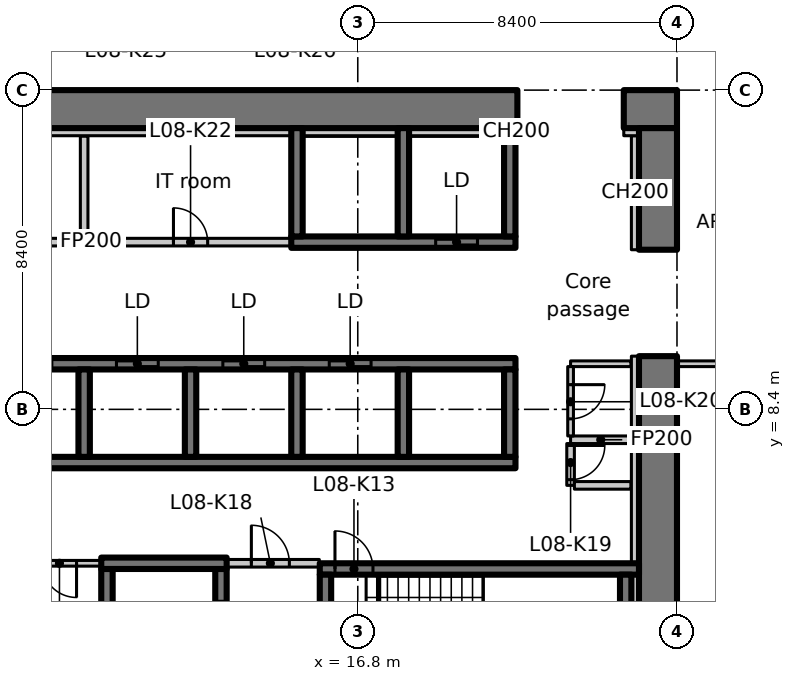
"""IFC4 building model, lengths in metres.
Left out: names, types, materials, properties, quantities, classifications, styles, units other than length and angle.
Written with IfcOpenShell. Run it as: python <this file> out.ifc"""

import sys

from ifc_helpers import new_model, si_unit, direction, frame, frame_2d, origin, place, context, subcontext, project, spatial, rectangle, extrude, element, fill, save


model = new_model("IFC4")
c1 = context("Model", 3, precision=1e-05, world=origin(), true_north=direction((0.0, 1.0)))
c2 = subcontext(c1, "Body", "Model", "MODEL_VIEW")
j1 = project(units=[si_unit("LENGTHUNIT", "METRE"), si_unit("PLANEANGLEUNIT", "RADIAN")], contexts=[c1])
p1 = place(None, origin())
s1 = spatial("IfcSite", under=j1, at=p1, CompositionType="ELEMENT")
p2 = place(p1, origin())
s2 = spatial("IfcBuilding", under=s1, at=p2, CompositionType="ELEMENT")
p3 = place(p2, frame((0.0, 0.0, 43.7)))
s3 = spatial("IfcBuildingStorey", under=s2, at=p3, CompositionType="ELEMENT", Elevation=43.7)
p4 = place(p3, frame((-1.1, 16.3, 0.0), z_axis=(0.0, 0.0, 1.0), x_axis=(1.0, 0.0, 0.0)))
e1 = element("IfcWall", 1, at=p4, inside=s3, PredefinedType="SHEAR", context=c2, shape_type="SweptSolid", body=[
    extrude(rectangle(XDim=22.1, YDim=1.0, at=frame_2d((11.05, 0.0))), origin(), (0.0, 0.0, 1.0), 3.35),
])
p5 = place(p4, frame((3.15, 0.0, 0.0)))
e2 = element("IfcOpeningElement", 2, at=p5, cuts=e1, PredefinedType="OPENING", context=c2, shape_type="SweptSolid", body=[
    extrude(rectangle(XDim=1.1, YDim=2.3, at=frame_2d((0.55, 1.15))), frame((0.0, 0.51, 0.0), z_axis=(0.0, -1.0, 0.0), x_axis=(1.0, 0.0, 0.0)), (0.0, 0.0, 1.0), 1.02),
])
p6 = place(p3, frame((23.8, 16.3, 0.0), z_axis=(0.0, 0.0, 1.0), x_axis=(1.0, 0.0, 0.0)))
e3 = element("IfcWall", 3, at=p6, inside=s3, PredefinedType="SHEAR", context=c2, shape_type="SweptSolid", body=[
    extrude(rectangle(XDim=1.4, YDim=1.0, at=frame_2d((0.7, 0.0))), origin(), (0.0, 0.0, 1.0), 3.35),
])
p7 = place(p3, frame((24.7, 1.0, 0.0), z_axis=(0.0, 0.0, 1.0), x_axis=(0.0, 1.0, 0.0)))
e4 = element("IfcWall", 4, at=p7, inside=s3, PredefinedType="SHEAR", context=c2, shape_type="SweptSolid", body=[
    extrude(rectangle(XDim=8.8, YDim=1.0, at=frame_2d((4.4, 0.0))), origin(), (0.0, 0.0, 1.0), 3.35),
])
p8 = place(p3, frame((24.7, 12.6, 0.0), z_axis=(0.0, 0.0, 1.0), x_axis=(0.0, 1.0, 0.0)))
e5 = element("IfcWall", 5, at=p8, inside=s3, PredefinedType="SHEAR", context=c2, shape_type="SweptSolid", body=[
    extrude(rectangle(XDim=3.2, YDim=1.0, at=frame_2d((1.6, 0.0))), origin(), (0.0, 0.0, 1.0), 3.35),
])
p9 = place(p3, frame((24.1, 12.6, 0.0), z_axis=(0.0, 0.0, 1.0), x_axis=(0.0, 1.0, 0.0)))
e6 = element("IfcWall", 6, at=p9, inside=s3, PredefinedType="PARTITIONING", context=c2, shape_type="SweptSolid", body=[
    extrude(rectangle(XDim=3.0, YDim=0.2, at=frame_2d((1.5, 0.0))), origin(), (0.0, 0.0, 1.0), 3.35),
])
p10 = place(p3, frame((23.8, 15.7, 0.0), z_axis=(0.0, 0.0, 1.0), x_axis=(1.0, 0.0, 0.0)))
e7 = element("IfcWall", 7, at=p10, inside=s3, PredefinedType="PARTITIONING", context=c2, shape_type="SweptSolid", body=[
    extrude(rectangle(XDim=0.4, YDim=0.2, at=frame_2d((0.2, 0.0))), origin(), (0.0, 0.0, 1.0), 3.35),
])
p11 = place(p3, frame((1.0, 7.0, 0.0), z_axis=(0.0, 0.0, 1.0), x_axis=(1.0, 0.0, 0.0)))
e8 = element("IfcWall", 8, at=p11, inside=s3, PredefinedType="SHEAR", context=c2, shape_type="SweptSolid", body=[
    extrude(rectangle(XDim=19.95, YDim=0.3, at=frame_2d((9.975, 0.0))), origin(), (0.0, 0.0, 1.0), 3.35),
])
p12 = place(p3, frame((1.0, 9.6, 0.0), z_axis=(0.0, 0.0, 1.0), x_axis=(1.0, 0.0, 0.0)))
e9 = element("IfcWall", 9, at=p12, inside=s3, PredefinedType="SHEAR", context=c2, shape_type="SweptSolid", body=[
    extrude(rectangle(XDim=19.95, YDim=0.3, at=frame_2d((9.975, 0.0))), origin(), (0.0, 0.0, 1.0), 3.35),
])
p13 = place(p12, frame((1.05, 0.0, 0.0)))
e10 = element("IfcOpeningElement", 10, at=p13, cuts=e9, PredefinedType="OPENING", context=c2, shape_type="SweptSolid", body=[
    extrude(rectangle(XDim=1.1, YDim=2.3, at=frame_2d((0.55, 1.15))), frame((0.0, 0.16, 0.0), z_axis=(0.0, -1.0, 0.0), x_axis=(1.0, 0.0, 0.0)), (0.0, 0.0, 1.0), 0.32),
])
p14 = place(p12, frame((3.85, 0.0, 0.0)))
e11 = element("IfcOpeningElement", 11, at=p14, cuts=e9, PredefinedType="OPENING", context=c2, shape_type="SweptSolid", body=[
    extrude(rectangle(XDim=1.1, YDim=2.3, at=frame_2d((0.55, 1.15))), frame((0.0, 0.16, 0.0), z_axis=(0.0, -1.0, 0.0), x_axis=(1.0, 0.0, 0.0)), (0.0, 0.0, 1.0), 0.32),
])
p15 = place(p12, frame((6.65, 0.0, 0.0)))
e12 = element("IfcOpeningElement", 12, at=p15, cuts=e9, PredefinedType="OPENING", context=c2, shape_type="SweptSolid", body=[
    extrude(rectangle(XDim=1.1, YDim=2.3, at=frame_2d((0.55, 1.15))), frame((0.0, 0.16, 0.0), z_axis=(0.0, -1.0, 0.0), x_axis=(1.0, 0.0, 0.0)), (0.0, 0.0, 1.0), 0.32),
])
p16 = place(p12, frame((9.45, 0.0, 0.0)))
e13 = element("IfcOpeningElement", 13, at=p16, cuts=e9, PredefinedType="OPENING", context=c2, shape_type="SweptSolid", body=[
    extrude(rectangle(XDim=1.1, YDim=2.3, at=frame_2d((0.55, 1.15))), frame((0.0, 0.16, 0.0), z_axis=(0.0, -1.0, 0.0), x_axis=(1.0, 0.0, 0.0)), (0.0, 0.0, 1.0), 0.32),
])
p17 = place(p12, frame((12.25, 0.0, 0.0)))
e14 = element("IfcOpeningElement", 14, at=p17, cuts=e9, PredefinedType="OPENING", context=c2, shape_type="SweptSolid", body=[
    extrude(rectangle(XDim=1.1, YDim=2.3, at=frame_2d((0.55, 1.15))), frame((0.0, 0.16, 0.0), z_axis=(0.0, -1.0, 0.0), x_axis=(1.0, 0.0, 0.0)), (0.0, 0.0, 1.0), 0.32),
])
p18 = place(p12, frame((15.05, 0.0, 0.0)))
e15 = element("IfcOpeningElement", 15, at=p18, cuts=e9, PredefinedType="OPENING", context=c2, shape_type="SweptSolid", body=[
    extrude(rectangle(XDim=1.1, YDim=2.3, at=frame_2d((0.55, 1.15))), frame((0.0, 0.16, 0.0), z_axis=(0.0, -1.0, 0.0), x_axis=(1.0, 0.0, 0.0)), (0.0, 0.0, 1.0), 0.32),
])
for number, where, z_axis, x_axis in (
    (16, (9.6, 7.15, 0.0), (0.0, 0.0, 1.0), (0.0, 1.0, 0.0)),
    (17, (12.4, 7.15, 0.0), (0.0, 0.0, 1.0), (0.0, 1.0, 0.0)),
    (18, (15.2, 7.15, 0.0), (0.0, 0.0, 1.0), (0.0, 1.0, 0.0)),
    (19, (18.0, 7.15, 0.0), (0.0, 0.0, 1.0), (0.0, 1.0, 0.0)),
    (20, (20.8, 7.15, 0.0), (0.0, 0.0, 1.0), (0.0, 1.0, 0.0)),
):
    element("IfcWall", number, at=place(p3, frame(where, z_axis=z_axis, x_axis=x_axis)), inside=s3, PredefinedType="SHEAR", context=c2, shape_type="SweptSolid", body=[
        extrude(rectangle(XDim=2.3, YDim=0.3, at=frame_2d((1.15, 0.0))), origin(), (0.0, 0.0, 1.0), 3.35),
    ])
p19 = place(p3, frame((15.05, 12.8, 0.0), z_axis=(0.0, 0.0, 1.0), x_axis=(1.0, 0.0, 0.0)))
e21 = element("IfcWall", 21, at=p19, inside=s3, PredefinedType="SHEAR", context=c2, shape_type="SweptSolid", body=[
    extrude(rectangle(XDim=5.9, YDim=0.3, at=frame_2d((2.95, 0.0))), origin(), (0.0, 0.0, 1.0), 3.35),
])
p20 = place(p19, frame((3.8, 0.0, 0.0)))
e22 = element("IfcOpeningElement", 22, at=p20, cuts=e21, PredefinedType="OPENING", context=c2, shape_type="SweptSolid", body=[
    extrude(rectangle(XDim=1.1, YDim=2.3, at=frame_2d((0.55, 1.15))), frame((0.0, 0.16, 0.0), z_axis=(0.0, -1.0, 0.0), x_axis=(1.0, 0.0, 0.0)), (0.0, 0.0, 1.0), 0.32),
])
for number, where, z_axis, x_axis in (
    (23, (15.2, 12.95, 0.0), (0.0, 0.0, 1.0), (0.0, 1.0, 0.0)),
    (24, (18.0, 12.95, 0.0), (0.0, 0.0, 1.0), (0.0, 1.0, 0.0)),
    (25, (20.8, 12.95, 0.0), (0.0, 0.0, 1.0), (0.0, 1.0, 0.0)),
):
    element("IfcWall", number, at=place(p3, frame(where, z_axis=z_axis, x_axis=x_axis)), inside=s3, PredefinedType="SHEAR", context=c2, shape_type="SweptSolid", body=[
        extrude(rectangle(XDim=2.85, YDim=0.3, at=frame_2d((1.425, 0.0))), origin(), (0.0, 0.0, 1.0), 3.35),
    ])
p21 = place(p3, frame((10.2, 1.0, 0.0), z_axis=(0.0, 0.0, 1.0), x_axis=(0.0, 1.0, 0.0)))
e26 = element("IfcWall", 26, at=p21, inside=s3, PredefinedType="SHEAR", context=c2, shape_type="SweptSolid", body=[
    extrude(rectangle(XDim=3.2, YDim=0.3, at=frame_2d((1.6, 0.0))), origin(), (0.0, 0.0, 1.0), 3.35),
])
p22 = place(p3, frame((13.2, 1.0, 0.0), z_axis=(0.0, 0.0, 1.0), x_axis=(0.0, 1.0, 0.0)))
e27 = element("IfcWall", 27, at=p22, inside=s3, PredefinedType="SHEAR", context=c2, shape_type="SweptSolid", body=[
    extrude(rectangle(XDim=3.2, YDim=0.3, at=frame_2d((1.6, 0.0))), origin(), (0.0, 0.0, 1.0), 3.35),
])
p23 = place(p22, frame((1.25, 0.0, 0.0)))
e28 = element("IfcOpeningElement", 28, at=p23, cuts=e27, PredefinedType="OPENING", context=c2, shape_type="SweptSolid", body=[
    extrude(rectangle(XDim=1.1, YDim=2.3, at=frame_2d((0.55, 1.15))), frame((0.0, 0.16, 0.0), z_axis=(0.0, -1.0, 0.0), x_axis=(1.0, 0.0, 0.0)), (0.0, 0.0, 1.0), 0.32),
])
p24 = place(p3, frame((10.05, 4.35, 0.0), z_axis=(0.0, 0.0, 1.0), x_axis=(1.0, 0.0, 0.0)))
e29 = element("IfcWall", 29, at=p24, inside=s3, PredefinedType="SHEAR", context=c2, shape_type="SweptSolid", body=[
    extrude(rectangle(XDim=3.3, YDim=0.3, at=frame_2d((1.65, 0.0))), origin(), (0.0, 0.0, 1.0), 3.35),
])
p25 = place(p3, frame((15.8, 4.2, 0.0), z_axis=(0.0, 0.0, 1.0), x_axis=(1.0, 0.0, 0.0)))
e30 = element("IfcWall", 30, at=p25, inside=s3, PredefinedType="SHEAR", context=c2, shape_type="SweptSolid", body=[
    extrude(rectangle(XDim=8.4, YDim=0.3, at=frame_2d((4.2, 0.0))), origin(), (0.0, 0.0, 1.0), 3.35),
])
p26 = place(p25, frame((0.4, 0.0, 0.0)))
e31 = element("IfcOpeningElement", 31, at=p26, cuts=e30, PredefinedType="OPENING", context=c2, shape_type="SweptSolid", body=[
    extrude(rectangle(XDim=1.0, YDim=2.1, at=frame_2d((0.5, 1.05))), frame((0.0, 0.16, 0.0), z_axis=(0.0, -1.0, 0.0), x_axis=(1.0, 0.0, 0.0)), (0.0, 0.0, 1.0), 0.32),
])
p27 = place(p3, frame((15.95, 1.5, 0.0), z_axis=(0.0, 0.0, 1.0), x_axis=(0.0, 1.0, 0.0)))
e32 = element("IfcWall", 32, at=p27, inside=s3, PredefinedType="SHEAR", context=c2, shape_type="SweptSolid", body=[
    extrude(rectangle(XDim=2.55, YDim=0.3, at=frame_2d((1.275, 0.0))), origin(), (0.0, 0.0, 1.0), 3.35),
])
p28 = place(p27, frame((0.8, 0.0, 0.0)))
e33 = element("IfcOpeningElement", 33, at=p28, cuts=e32, PredefinedType="OPENING", context=c2, shape_type="SweptSolid", body=[
    extrude(rectangle(XDim=1.0, YDim=2.1, at=frame_2d((0.5, 1.05))), frame((0.0, 0.16, 0.0), z_axis=(0.0, -1.0, 0.0), x_axis=(1.0, 0.0, 0.0)), (0.0, 0.0, 1.0), 0.32),
])
p29 = place(p3, frame((23.85, 1.5, 0.0), z_axis=(0.0, 0.0, 1.0), x_axis=(0.0, 1.0, 0.0)))
e34 = element("IfcWall", 34, at=p29, inside=s3, PredefinedType="SHEAR", context=c2, shape_type="SweptSolid", body=[
    extrude(rectangle(XDim=2.55, YDim=0.3, at=frame_2d((1.275, 0.0))), origin(), (0.0, 0.0, 1.0), 3.35),
])
p30 = place(p3, frame((13.362, 4.35, 0.0), z_axis=(0.0, 0.0, 1.0), x_axis=(1.0, 0.0, 0.0)))
e35 = element("IfcWall", 35, at=p30, inside=s3, PredefinedType="PARTITIONING", context=c2, shape_type="SweptSolid", body=[
    extrude(rectangle(XDim=2.426, YDim=0.2, at=frame_2d((1.213, 0.0))), origin(), (0.0, 0.0, 1.0), 3.35),
])
p31 = place(p30, frame((0.638, 0.0, 0.0)))
e36 = element("IfcOpeningElement", 36, at=p31, cuts=e35, PredefinedType="OPENING", context=c2, shape_type="SweptSolid", body=[
    extrude(rectangle(XDim=1.0, YDim=2.1, at=frame_2d((0.5, 1.05))), frame((0.0, 0.11, 0.0), z_axis=(0.0, -1.0, 0.0), x_axis=(1.0, 0.0, 0.0)), (0.0, 0.0, 1.0), 0.22),
])
p32 = place(p3, frame((4.162, 12.8, 0.0), z_axis=(0.0, 0.0, 1.0), x_axis=(1.0, 0.0, 0.0)))
e37 = element("IfcWall", 37, at=p32, inside=s3, PredefinedType="PARTITIONING", context=c2, shape_type="SweptSolid", body=[
    extrude(rectangle(XDim=5.438, YDim=0.2, at=frame_2d((2.719, 0.0))), origin(), (0.0, 0.0, 1.0), 3.35),
])
p33 = place(p32, frame((2.188, 0.0, 0.0)))
e38 = element("IfcOpeningElement", 38, at=p33, cuts=e37, PredefinedType="OPENING", context=c2, shape_type="SweptSolid", body=[
    extrude(rectangle(XDim=0.9, YDim=2.1, at=frame_2d((0.45, 1.05))), frame((0.0, 0.11, 0.0), z_axis=(0.0, -1.0, 0.0), x_axis=(1.0, 0.0, 0.0)), (0.0, 0.0, 1.0), 0.22),
])
p34 = place(p3, frame((9.6, 12.8, 0.0), z_axis=(0.0, 0.0, 1.0), x_axis=(1.0, 0.0, 0.0)))
e39 = element("IfcWall", 39, at=p34, inside=s3, PredefinedType="PARTITIONING", context=c2, shape_type="SweptSolid", body=[
    extrude(rectangle(XDim=5.438, YDim=0.2, at=frame_2d((2.719, 0.0))), origin(), (0.0, 0.0, 1.0), 3.35),
])
p35 = place(p34, frame((2.35, 0.0, 0.0)))
e40 = element("IfcOpeningElement", 40, at=p35, cuts=e39, PredefinedType="OPENING", context=c2, shape_type="SweptSolid", body=[
    extrude(rectangle(XDim=0.9, YDim=2.1, at=frame_2d((0.45, 1.05))), frame((0.0, 0.11, 0.0), z_axis=(0.0, -1.0, 0.0), x_axis=(1.0, 0.0, 0.0)), (0.0, 0.0, 1.0), 0.22),
])
p36 = place(p3, frame((9.6, 15.588, 0.0), z_axis=(0.0, 0.0, 1.0), x_axis=(0.0, -1.0, 0.0)))
e41 = element("IfcWall", 41, at=p36, inside=s3, PredefinedType="PARTITIONING", context=c2, shape_type="SweptSolid", body=[
    extrude(rectangle(XDim=2.688, YDim=0.2, at=frame_2d((1.344, 0.0))), origin(), (0.0, 0.0, 1.0), 3.35),
])
p37 = place(p3, frame((23.988, 7.6, 0.0), z_axis=(0.0, 0.0, 1.0), x_axis=(-1.0, 0.0, 0.0)))
e42 = element("IfcWall", 42, at=p37, inside=s3, PredefinedType="PARTITIONING", context=c2, shape_type="SweptSolid", body=[
    extrude(rectangle(XDim=1.588, YDim=0.2, at=frame_2d((0.794, 0.0))), origin(), (0.0, 0.0, 1.0), 3.35),
])
p38 = place(p3, frame((22.4, 7.5, 0.0), z_axis=(0.0, 0.0, 1.0), x_axis=(0.0, -1.0, 0.0)))
e43 = element("IfcWall", 43, at=p38, inside=s3, PredefinedType="PARTITIONING", context=c2, shape_type="SweptSolid", body=[
    extrude(rectangle(XDim=1.1, YDim=0.2, at=frame_2d((0.55, 0.0))), origin(), (0.0, 0.0, 1.0), 3.35),
])
p39 = place(p38, frame((0.05, 0.0, 0.0)))
e44 = element("IfcOpeningElement", 44, at=p39, cuts=e43, PredefinedType="OPENING", context=c2, shape_type="SweptSolid", body=[
    extrude(rectangle(XDim=0.9, YDim=2.1, at=frame_2d((0.45, 1.05))), frame((0.0, 0.11, 0.0), z_axis=(0.0, -1.0, 0.0), x_axis=(1.0, 0.0, 0.0)), (0.0, 0.0, 1.0), 0.22),
])
p40 = place(p3, frame((22.5, 6.4, 0.0), z_axis=(0.0, 0.0, 1.0), x_axis=(1.0, 0.0, 0.0)))
e45 = element("IfcWall", 45, at=p40, inside=s3, PredefinedType="PARTITIONING", context=c2, shape_type="SweptSolid", body=[
    extrude(rectangle(XDim=1.488, YDim=0.2, at=frame_2d((0.744, 0.0))), origin(), (0.0, 0.0, 1.0), 3.35),
])
p41 = place(p3, frame((10.038, 4.35, 0.0), z_axis=(0.0, 0.0, 1.0), x_axis=(-1.0, 0.0, 0.0)))
e46 = element("IfcWall", 46, at=p41, inside=s3, PredefinedType="PARTITIONING", context=c2, shape_type="SweptSolid", body=[
    extrude(rectangle(XDim=2.263, YDim=0.15, at=frame_2d((1.132, 0.0))), origin(), (0.0, 0.0, 1.0), 3.35),
])
p42 = place(p41, frame((0.638, 0.0, 0.0)))
e47 = element("IfcOpeningElement", 47, at=p42, cuts=e46, PredefinedType="OPENING", context=c2, shape_type="SweptSolid", body=[
    extrude(rectangle(XDim=0.9, YDim=2.1, at=frame_2d((0.45, 1.05))), frame((0.0, 0.085, 0.0), z_axis=(0.0, -1.0, 0.0), x_axis=(1.0, 0.0, 0.0)), (0.0, 0.0, 1.0), 0.17),
])
p43 = place(p3, frame((23.988, 9.6, 0.0), z_axis=(0.0, 0.0, 1.0), x_axis=(-1.0, 0.0, 0.0)))
e48 = element("IfcWall", 48, at=p43, inside=s3, PredefinedType="PARTITIONING", context=c2, shape_type="SweptSolid", body=[
    extrude(rectangle(XDim=1.588, YDim=0.15, at=frame_2d((0.794, 0.0))), origin(), (0.0, 0.0, 1.0), 3.35),
])
p44 = place(p3, frame((22.4, 9.525, 0.0), z_axis=(0.0, 0.0, 1.0), x_axis=(0.0, -1.0, 0.0)))
e49 = element("IfcWall", 49, at=p44, inside=s3, PredefinedType="PARTITIONING", context=c2, shape_type="SweptSolid", body=[
    extrude(rectangle(XDim=1.825, YDim=0.15, at=frame_2d((0.913, 0.0))), origin(), (0.0, 0.0, 1.0), 3.35),
])
p45 = place(p44, frame((0.475, 0.0, 0.0)))
e50 = element("IfcOpeningElement", 50, at=p45, cuts=e49, PredefinedType="OPENING", context=c2, shape_type="SweptSolid", body=[
    extrude(rectangle(XDim=0.9, YDim=2.1, at=frame_2d((0.45, 1.05))), frame((0.0, 0.085, 0.0), z_axis=(0.0, -1.0, 0.0), x_axis=(1.0, 0.0, 0.0)), (0.0, 0.0, 1.0), 0.17),
])
p46 = place(p3, frame((4.15, 15.7, 0.0), z_axis=(0.0, 0.0, 1.0), x_axis=(1.0, 0.0, 0.0)))
e51 = element("IfcWall", 51, at=p46, inside=s3, PredefinedType="PARTITIONING", context=c2, shape_type="SweptSolid", body=[
    extrude(rectangle(XDim=10.9, YDim=0.2, at=frame_2d((5.45, 0.0))), origin(), (0.0, 0.0, 1.0), 3.35),
])
for number, where, z_axis, x_axis in (
    (52, (15.35, 15.7, 0.0), (0.0, 0.0, 1.0), (1.0, 0.0, 0.0)),
    (53, (18.15, 15.7, 0.0), (0.0, 0.0, 1.0), (1.0, 0.0, 0.0)),
):
    element("IfcWall", number, at=place(p3, frame(where, z_axis=z_axis, x_axis=x_axis)), inside=s3, PredefinedType="PARTITIONING", context=c2, shape_type="SweptSolid", body=[
        extrude(rectangle(XDim=2.5, YDim=0.2, at=frame_2d((1.25, 0.0))), origin(), (0.0, 0.0, 1.0), 3.35),
    ])
p47 = place(p3, frame((20.95, 15.7, 0.0), z_axis=(0.0, 0.0, 1.0), x_axis=(1.0, 0.0, 0.0)))
e54 = element("IfcWall", 54, at=p47, inside=s3, PredefinedType="PARTITIONING", context=c2, shape_type="SweptSolid", body=[
    extrude(rectangle(XDim=0.05, YDim=0.2, at=frame_2d((0.025, 0.0))), origin(), (0.0, 0.0, 1.0), 3.35),
])
p48 = place(p3, frame((24.1, 1.5, 0.0), z_axis=(0.0, 0.0, 1.0), x_axis=(0.0, 1.0, 0.0)))
e55 = element("IfcWall", 55, at=p48, inside=s3, PredefinedType="PARTITIONING", context=c2, shape_type="SweptSolid", body=[
    extrude(rectangle(XDim=2.55, YDim=0.2, at=frame_2d((1.275, 0.0))), origin(), (0.0, 0.0, 1.0), 3.35),
])
p49 = place(p3, frame((24.1, 4.35, 0.0), z_axis=(0.0, 0.0, 1.0), x_axis=(0.0, 1.0, 0.0)))
e56 = element("IfcWall", 56, at=p49, inside=s3, PredefinedType="PARTITIONING", context=c2, shape_type="SweptSolid", body=[
    extrude(rectangle(XDim=5.45, YDim=0.2, at=frame_2d((2.725, 0.0))), origin(), (0.0, 0.0, 1.0), 3.35),
])
p50 = place(p3, frame((29.4, 9.6, 0.0), z_axis=(0.0, 0.0, 1.0), x_axis=(-1.0, 0.0, 0.0)))
e57 = element("IfcWall", 57, at=p50, inside=s3, PredefinedType="PARTITIONING", context=c2, shape_type="SweptSolid", body=[
    extrude(rectangle(XDim=4.2, YDim=0.15, at=frame_2d((2.1, 0.0))), origin(), (0.0, 0.0, 1.0), 3.33),
])
p51 = place(p16, origin())
e58 = element("IfcDoor", 58, at=p51, inside=s3, OperationType="SLIDING_TO_LEFT", PredefinedType="DOOR", context=c2, shape_type="SweptSolid", body=[
    extrude(rectangle(XDim=1.1, YDim=2.3, at=frame_2d((0.55, 1.15))), frame((0.0, 0.025, 0.0), z_axis=(0.0, -1.0, 0.0), x_axis=(1.0, 0.0, 0.0)), (0.0, 0.0, 1.0), 0.05),
])
fill(e13, e58)
p52 = place(p17, origin())
e59 = element("IfcDoor", 59, at=p52, inside=s3, OperationType="SLIDING_TO_LEFT", PredefinedType="DOOR", context=c2, shape_type="SweptSolid", body=[
    extrude(rectangle(XDim=1.1, YDim=2.3, at=frame_2d((0.55, 1.15))), frame((0.0, 0.025, 0.0), z_axis=(0.0, -1.0, 0.0), x_axis=(1.0, 0.0, 0.0)), (0.0, 0.0, 1.0), 0.05),
])
fill(e14, e59)
p53 = place(p18, origin())
e60 = element("IfcDoor", 60, at=p53, inside=s3, OperationType="SLIDING_TO_LEFT", PredefinedType="DOOR", context=c2, shape_type="SweptSolid", body=[
    extrude(rectangle(XDim=1.1, YDim=2.3, at=frame_2d((0.55, 1.15))), frame((0.0, 0.025, 0.0), z_axis=(0.0, -1.0, 0.0), x_axis=(1.0, 0.0, 0.0)), (0.0, 0.0, 1.0), 0.05),
])
fill(e15, e60)
p54 = place(p20, origin())
e61 = element("IfcDoor", 61, at=p54, inside=s3, OperationType="SLIDING_TO_LEFT", PredefinedType="DOOR", context=c2, shape_type="SweptSolid", body=[
    extrude(rectangle(XDim=1.1, YDim=2.3, at=frame_2d((0.55, 1.15))), frame((0.0, 0.025, 0.0), z_axis=(0.0, -1.0, 0.0), x_axis=(1.0, 0.0, 0.0)), (0.0, 0.0, 1.0), 0.05),
])
fill(e22, e61)
p55 = place(p26, origin())
e62 = element("IfcDoor", 62, at=p55, inside=s3, OperationType="SINGLE_SWING_LEFT", PredefinedType="DOOR", context=c2, shape_type="SweptSolid", body=[
    extrude(rectangle(XDim=1.0, YDim=2.1, at=frame_2d((0.5, 1.05))), frame((0.0, 0.025, 0.0), z_axis=(0.0, -1.0, 0.0), x_axis=(1.0, 0.0, 0.0)), (0.0, 0.0, 1.0), 0.05),
])
fill(e31, e62)
p56 = place(p42, origin())
e63 = element("IfcDoor", 63, at=p56, inside=s3, OperationType="SINGLE_SWING_LEFT", PredefinedType="DOOR", context=c2, shape_type="SweptSolid", body=[
    extrude(rectangle(XDim=0.9, YDim=2.1, at=frame_2d((0.45, 1.05))), frame((0.0, 0.025, 0.0), z_axis=(0.0, -1.0, 0.0), x_axis=(1.0, 0.0, 0.0)), (0.0, 0.0, 1.0), 0.05),
])
fill(e47, e63)
p57 = place(p31, origin())
e64 = element("IfcDoor", 64, at=p57, inside=s3, OperationType="SINGLE_SWING_RIGHT", PredefinedType="DOOR", context=c2, shape_type="SweptSolid", body=[
    extrude(rectangle(XDim=1.0, YDim=2.1, at=frame_2d((0.5, 1.05))), frame((0.0, 0.025, 0.0), z_axis=(0.0, -1.0, 0.0), x_axis=(1.0, 0.0, 0.0)), (0.0, 0.0, 1.0), 0.05),
])
fill(e36, e64)
p58 = place(p39, origin())
e65 = element("IfcDoor", 65, at=p58, inside=s3, OperationType="SINGLE_SWING_LEFT", PredefinedType="DOOR", context=c2, shape_type="SweptSolid", body=[
    extrude(rectangle(XDim=0.9, YDim=2.1, at=frame_2d((0.45, 1.05))), frame((0.0, 0.025, 0.0), z_axis=(0.0, -1.0, 0.0), x_axis=(1.0, 0.0, 0.0)), (0.0, 0.0, 1.0), 0.05),
])
fill(e44, e65)
p59 = place(p45, origin())
e66 = element("IfcDoor", 66, at=p59, inside=s3, OperationType="SINGLE_SWING_RIGHT", PredefinedType="DOOR", context=c2, shape_type="SweptSolid", body=[
    extrude(rectangle(XDim=0.9, YDim=2.1, at=frame_2d((0.45, 1.05))), frame((0.0, 0.025, 0.0), z_axis=(0.0, -1.0, 0.0), x_axis=(1.0, 0.0, 0.0)), (0.0, 0.0, 1.0), 0.05),
])
fill(e50, e66)
p60 = place(p35, origin())
e67 = element("IfcDoor", 67, at=p60, inside=s3, OperationType="SINGLE_SWING_RIGHT", PredefinedType="DOOR", context=c2, shape_type="SweptSolid", body=[
    extrude(rectangle(XDim=0.9, YDim=2.1, at=frame_2d((0.45, 1.05))), frame((0.0, 0.025, 0.0), z_axis=(0.0, -1.0, 0.0), x_axis=(1.0, 0.0, 0.0)), (0.0, 0.0, 1.0), 0.05),
])
fill(e40, e67)
save(model, sys.argv[1])
